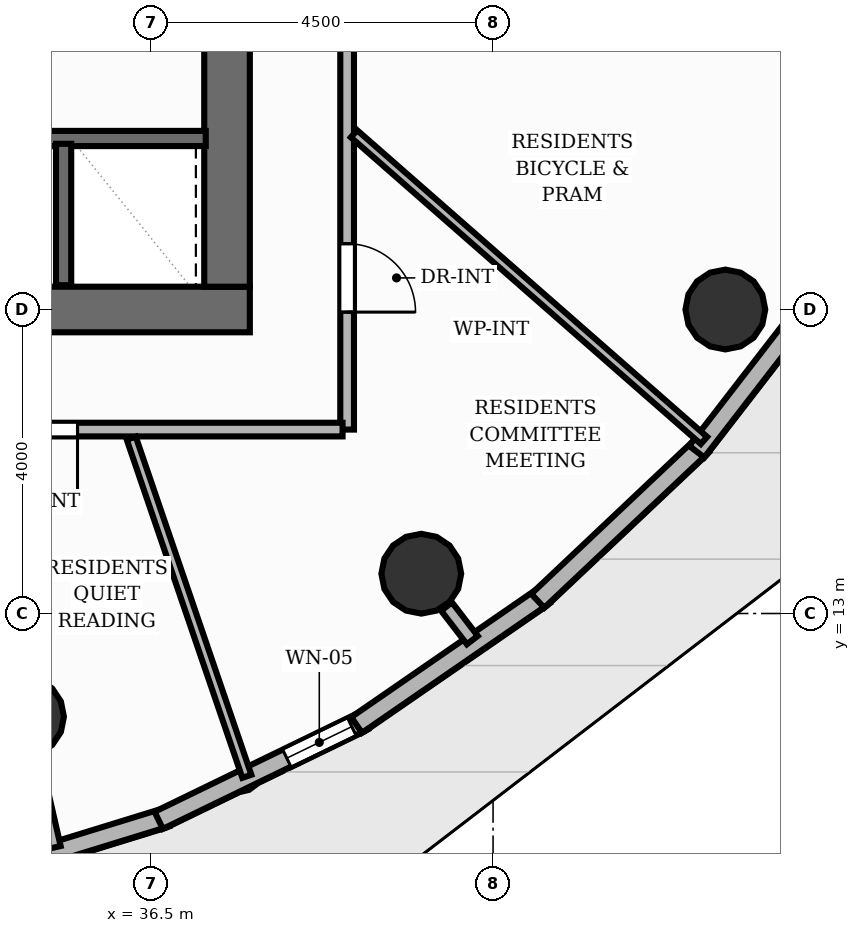
"""IFC4 building model, lengths in metres.
Left out: names, types, materials, properties, quantities, classifications, styles, units other than length and angle.
Written with IfcOpenShell. Run it as: python <this file> out.ifc"""

import sys

from ifc_helpers import new_model, si_unit, direction, frame, frame_2d, origin, origin_2d, place, context, subcontext, project, spatial, rectangle, circle, extrude, element, fill, save


model = new_model("IFC4")
c1 = context("Model", 3, precision=1e-05, world=origin(), true_north=direction((0.0, 1.0)))
c2 = subcontext(c1, "Body", "Model", "MODEL_VIEW")
j1 = project(units=[si_unit("LENGTHUNIT", "METRE"), si_unit("PLANEANGLEUNIT", "RADIAN")], contexts=[c1])
p1 = place(None, origin())
s1 = spatial("IfcSite", under=j1, at=p1, CompositionType="ELEMENT")
p2 = place(p1, origin())
s2 = spatial("IfcBuilding", under=s1, at=p2, CompositionType="ELEMENT")
p3 = place(p2, frame((0.0, 0.0, 129.76)))
s3 = spatial("IfcBuildingStorey", under=s2, at=p3, CompositionType="ELEMENT", Elevation=129.76)
p4 = place(p3, frame((22.7, 17.0, 0.0), z_axis=(0.0, 0.0, 1.0), x_axis=(1.0, 0.0, 0.0)))
e1 = element("IfcWall", 1, at=p4, inside=s3, PredefinedType="SHEAR", context=c2, shape_type="SweptSolid", body=[
    extrude(rectangle(XDim=15.1, YDim=0.6, at=frame_2d((7.55, 0.0))), origin(), (0.0, 0.0, 1.0), 3.2),
])
p5 = place(p4, frame((5.8, 0.0, 0.0)))
e2 = element("IfcOpeningElement", 2, at=p5, cuts=e1, PredefinedType="OPENING", context=c2, shape_type="SweptSolid", body=[
    extrude(rectangle(XDim=1.1, YDim=2.15, at=frame_2d((0.55, 1.075))), frame((0.0, 0.31, 0.0), z_axis=(0.0, -1.0, 0.0), x_axis=(1.0, 0.0, 0.0)), (0.0, 0.0, 1.0), 0.62),
])
p6 = place(p4, frame((9.35, 0.0, 0.0)))
e3 = element("IfcOpeningElement", 3, at=p6, cuts=e1, PredefinedType="OPENING", context=c2, shape_type="SweptSolid", body=[
    extrude(rectangle(XDim=0.9, YDim=2.1, at=frame_2d((0.45, 1.05))), frame((0.0, 0.31, 0.0), z_axis=(0.0, -1.0, 0.0), x_axis=(1.0, 0.0, 0.0)), (0.0, 0.0, 1.0), 0.62),
])
p7 = place(p3, frame((37.5, 17.3, 0.0), z_axis=(0.0, 0.0, 1.0), x_axis=(0.0, 1.0, 0.0)))
e4 = element("IfcWall", 4, at=p7, inside=s3, PredefinedType="SHEAR", context=c2, shape_type="SweptSolid", body=[
    extrude(rectangle(XDim=13.4, YDim=0.6, at=frame_2d((6.7, 0.0))), origin(), (0.0, 0.0, 1.0), 3.2),
])
for number, where, z_axis, x_axis in (
    (5, (34.829, 11.642, 0.0), (0.0, 0.0, 1.0), (1.0, 0.0, 0.0)),
    (6, (40.056, 13.523, 0.0), (0.0, 0.0, 1.0), (1.0, 0.0, 0.0)),
    (7, (44.056, 17.0, 0.0), (0.0, 0.0, 1.0), (1.0, 0.0, 0.0)),
):
    element("IfcColumn", number, at=place(p3, frame(where, z_axis=z_axis, x_axis=x_axis)), inside=s3, PredefinedType="COLUMN", context=c2, shape_type="SweptSolid", body=[
        extrude(circle(Radius=0.525, at=origin_2d()), origin(), (0.0, 0.0, 1.0), 3.2),
    ])
p8 = place(p3, frame((36.702, 10.319, 0.0), z_axis=(0.0, 0.0, 1.0), x_axis=(-0.955653025963, -0.294494981227, 0.0)))
e8 = element("IfcWall", 8, at=p8, inside=s3, PredefinedType="SOLIDWALL", context=c2, shape_type="SweptSolid", body=[
    extrude(rectangle(XDim=2.977, YDim=0.25, at=frame_2d((1.489, 0.0))), origin(), (0.0, 0.0, 1.0), 2.96),
])
p9 = place(p3, frame((39.299, 11.588, 0.0), z_axis=(0.0, 0.0, 1.0), x_axis=(-0.899657133161, -0.436597117206, 0.0)))
e9 = element("IfcWall", 9, at=p9, inside=s3, PredefinedType="SOLIDWALL", context=c2, shape_type="SweptSolid", body=[
    extrude(rectangle(XDim=2.998, YDim=0.25, at=frame_2d((1.499, 0.0))), origin(), (0.0, 0.0, 1.0), 2.96),
])
p10 = place(p9, frame((0.175, 0.0, 0.85)))
e10 = element("IfcOpeningElement", 10, at=p10, cuts=e9, PredefinedType="OPENING", context=c2, shape_type="SweptSolid", body=[
    extrude(rectangle(XDim=0.95, YDim=1.45, at=frame_2d((0.475, 0.725))), frame((0.0, 0.135, 0.0), z_axis=(0.0, -1.0, 0.0), x_axis=(1.0, 0.0, 0.0)), (0.0, 0.0, 1.0), 0.27),
])
p11 = place(p3, frame((41.673, 13.235, 0.0), z_axis=(0.0, 0.0, 1.0), x_axis=(-0.823228532994, -0.567710121863, 0.0)))
e11 = element("IfcWall", 11, at=p11, inside=s3, PredefinedType="SOLIDWALL", context=c2, shape_type="SweptSolid", body=[
    extrude(rectangle(XDim=2.998, YDim=0.25, at=frame_2d((1.499, 0.0))), origin(), (0.0, 0.0, 1.0), 2.96),
])
p12 = place(p3, frame((43.753, 15.211, 0.0), z_axis=(0.0, 0.0, 1.0), x_axis=(-0.727113217486, -0.686517566386, 0.0)))
e12 = element("IfcWall", 12, at=p12, inside=s3, PredefinedType="SOLIDWALL", context=c2, shape_type="SweptSolid", body=[
    extrude(rectangle(XDim=2.977, YDim=0.25, at=frame_2d((1.488, 0.0))), origin(), (0.0, 0.0, 1.0), 2.96),
])
p13 = place(p3, frame((45.475, 17.454, 0.0), z_axis=(0.0, 0.0, 1.0), x_axis=(-0.611416743811, -0.791308767415, 0.0)))
e13 = element("IfcWall", 13, at=p13, inside=s3, PredefinedType="SOLIDWALL", context=c2, shape_type="SweptSolid", body=[
    extrude(rectangle(XDim=2.937, YDim=0.25, at=frame_2d((1.468, 0.0))), origin(), (0.0, 0.0, 1.0), 2.96),
])
p14 = place(p3, frame((33.5, 19.25, 0.0), z_axis=(0.0, 0.0, 1.0), x_axis=(1.0, 0.0, 0.0)))
e14 = element("IfcWall", 14, at=p14, inside=s3, PredefinedType="SHEAR", context=c2, shape_type="SweptSolid", body=[
    extrude(rectangle(XDim=3.72, YDim=0.2, at=frame_2d((1.86, 0.0))), origin(), (0.0, 0.0, 1.0), 3.2),
])
p15 = place(p3, frame((35.35, 17.32, 0.0), z_axis=(0.0, 0.0, 1.0), x_axis=(0.0, 1.0, 0.0)))
e15 = element("IfcWall", 15, at=p15, inside=s3, PredefinedType="SHEAR", context=c2, shape_type="SweptSolid", body=[
    extrude(rectangle(XDim=1.86, YDim=0.2, at=frame_2d((0.93, 0.0))), origin(), (0.0, 0.0, 1.0), 3.2),
])
p16 = place(p3, frame((34.95, 11.111, 0.0), z_axis=(0.0, 0.0, 1.0), x_axis=(0.223107064029, -0.974793946422, 0.0)))
e16 = element("IfcWall", 16, at=p16, inside=s3, PredefinedType="PARTITIONING", context=c2, shape_type="SweptSolid", body=[
    extrude(rectangle(XDim=1.221, YDim=0.18, at=frame_2d((0.611, 0.0))), origin(), (0.0, 0.0, 1.0), 2.336),
])
p17 = place(p3, frame((40.388, 13.092, 0.0), z_axis=(0.0, 0.0, 1.0), x_axis=(0.609498830183, -0.792786967605, 0.0)))
e17 = element("IfcWall", 17, at=p17, inside=s3, PredefinedType="PARTITIONING", context=c2, shape_type="SweptSolid", body=[
    extrude(rectangle(XDim=0.557, YDim=0.18, at=frame_2d((0.278, 0.0))), origin(), (0.0, 0.0, 1.0), 2.336),
])
p18 = place(p3, frame((39.08, 23.848, 0.0), z_axis=(0.0, 0.0, 1.0), x_axis=(0.0, -1.0, 0.0)))
e18 = element("IfcWall", 18, at=p18, inside=s3, PredefinedType="PARTITIONING", context=c2, shape_type="SweptSolid", body=[
    extrude(rectangle(XDim=8.428, YDim=0.18, at=frame_2d((4.214, 0.0))), origin(), (0.0, 0.0, 1.0), 2.955),
])
p19 = place(p18, frame((2.327, 0.0, 0.0)))
e19 = element("IfcOpeningElement", 19, at=p19, cuts=e18, PredefinedType="OPENING", context=c2, shape_type="SweptSolid", body=[
    extrude(rectangle(XDim=0.9, YDim=2.1, at=frame_2d((0.45, 1.05))), frame((0.0, 0.1, 0.0), z_axis=(0.0, -1.0, 0.0), x_axis=(1.0, 0.0, 0.0)), (0.0, 0.0, 1.0), 0.2),
])
p20 = place(p18, frame((5.983, 0.0, 0.0)))
e20 = element("IfcOpeningElement", 20, at=p20, cuts=e18, PredefinedType="OPENING", context=c2, shape_type="SweptSolid", body=[
    extrude(rectangle(XDim=0.9, YDim=2.1, at=frame_2d((0.45, 1.05))), frame((0.0, 0.1, 0.0), z_axis=(0.0, -1.0, 0.0), x_axis=(1.0, 0.0, 0.0)), (0.0, 0.0, 1.0), 0.2),
])
p21 = place(p3, frame((39.02, 15.42, 0.0), z_axis=(0.0, 0.0, 1.0), x_axis=(-1.0, 0.0, 0.0)))
e21 = element("IfcWall", 21, at=p21, inside=s3, PredefinedType="PARTITIONING", context=c2, shape_type="SweptSolid", body=[
    extrude(rectangle(XDim=9.922, YDim=0.18, at=frame_2d((4.961, 0.0))), origin(), (0.0, 0.0, 1.0), 2.955),
])
p22 = place(p21, frame((3.487, 0.0, 0.0)))
e22 = element("IfcOpeningElement", 22, at=p22, cuts=e21, PredefinedType="OPENING", context=c2, shape_type="SweptSolid", body=[
    extrude(rectangle(XDim=0.9, YDim=2.1, at=frame_2d((0.45, 1.05))), frame((0.0, 0.1, 0.0), z_axis=(0.0, -1.0, 0.0), x_axis=(1.0, 0.0, 0.0)), (0.0, 0.0, 1.0), 0.2),
])
p23 = place(p21, frame((6.571, 0.0, 0.0)))
e23 = element("IfcOpeningElement", 23, at=p23, cuts=e21, PredefinedType="OPENING", context=c2, shape_type="SweptSolid", body=[
    extrude(rectangle(XDim=0.9, YDim=2.1, at=frame_2d((0.45, 1.05))), frame((0.0, 0.1, 0.0), z_axis=(0.0, -1.0, 0.0), x_axis=(1.0, 0.0, 0.0)), (0.0, 0.0, 1.0), 0.2),
])
p24 = place(p3, frame((43.775, 15.277, 0.0), z_axis=(0.0, 0.0, 1.0), x_axis=(-0.752092313191, 0.659057776252, 0.0)))
e24 = element("IfcWall", 24, at=p24, inside=s3, PredefinedType="PARTITIONING", context=c2, shape_type="SweptSolid", body=[
    extrude(rectangle(XDim=6.122, YDim=0.125, at=frame_2d((3.061, 0.0))), origin(), (0.0, 0.0, 1.0), 2.955),
])
p25 = place(p3, frame((39.174, 22.723, 0.0), z_axis=(0.0, 0.0, 1.0), x_axis=(0.942245152982, -0.334923978959, 0.0)))
e25 = element("IfcWall", 25, at=p25, inside=s3, PredefinedType="PARTITIONING", context=c2, shape_type="SweptSolid", body=[
    extrude(rectangle(XDim=8.094, YDim=0.125, at=frame_2d((4.047, 0.0))), origin(), (0.0, 0.0, 1.0), 2.336),
])
p26 = place(p25, frame((3.597, 0.0, 0.0)))
e26 = element("IfcOpeningElement", 26, at=p26, cuts=e25, PredefinedType="OPENING", context=c2, shape_type="SweptSolid", body=[
    extrude(rectangle(XDim=0.9, YDim=2.1, at=frame_2d((0.45, 1.05))), frame((0.0, 0.073, 0.0), z_axis=(0.0, -1.0, 0.0), x_axis=(1.0, 0.0, 0.0)), (0.0, 0.0, 1.0), 0.145),
])
p27 = place(p3, frame((37.76, 10.858, 0.0), z_axis=(0.0, 0.0, 1.0), x_axis=(-0.323447862149, 0.946245993635, 0.0)))
e27 = element("IfcWall", 27, at=p27, inside=s3, PredefinedType="PARTITIONING", context=c2, shape_type="SweptSolid", body=[
    extrude(rectangle(XDim=4.701, YDim=0.125, at=frame_2d((2.351, 0.0))), origin(), (0.0, 0.0, 1.0), 2.955),
])
p28 = place(p10, origin())
e28 = element("IfcWindow", 28, at=p28, inside=s3, PartitioningType="SINGLE_PANEL", PredefinedType="WINDOW", context=c2, shape_type="SweptSolid", body=[
    extrude(rectangle(XDim=0.95, YDim=1.45, at=frame_2d((0.475, 0.725))), frame((0.0, 0.03, 0.0), z_axis=(0.0, -1.0, 0.0), x_axis=(1.0, 0.0, 0.0)), (0.0, 0.0, 1.0), 0.06),
])
fill(e10, e28)
p29 = place(p20, origin())
e29 = element("IfcDoor", 29, at=p29, inside=s3, OperationType="SINGLE_SWING_RIGHT", PredefinedType="DOOR", context=c2, shape_type="SweptSolid", body=[
    extrude(rectangle(XDim=0.9, YDim=2.1, at=frame_2d((0.45, 1.05))), frame((0.0, 0.025, 0.0), z_axis=(0.0, -1.0, 0.0), x_axis=(1.0, 0.0, 0.0)), (0.0, 0.0, 1.0), 0.05),
])
fill(e20, e29)
p30 = place(p22, origin())
e30 = element("IfcDoor", 30, at=p30, inside=s3, OperationType="SINGLE_SWING_LEFT", PredefinedType="DOOR", context=c2, shape_type="SweptSolid", body=[
    extrude(rectangle(XDim=0.9, YDim=2.1, at=frame_2d((0.45, 1.05))), frame((0.0, 0.025, 0.0), z_axis=(0.0, -1.0, 0.0), x_axis=(1.0, 0.0, 0.0)), (0.0, 0.0, 1.0), 0.05),
])
fill(e22, e30)
save(model, sys.argv[1])
